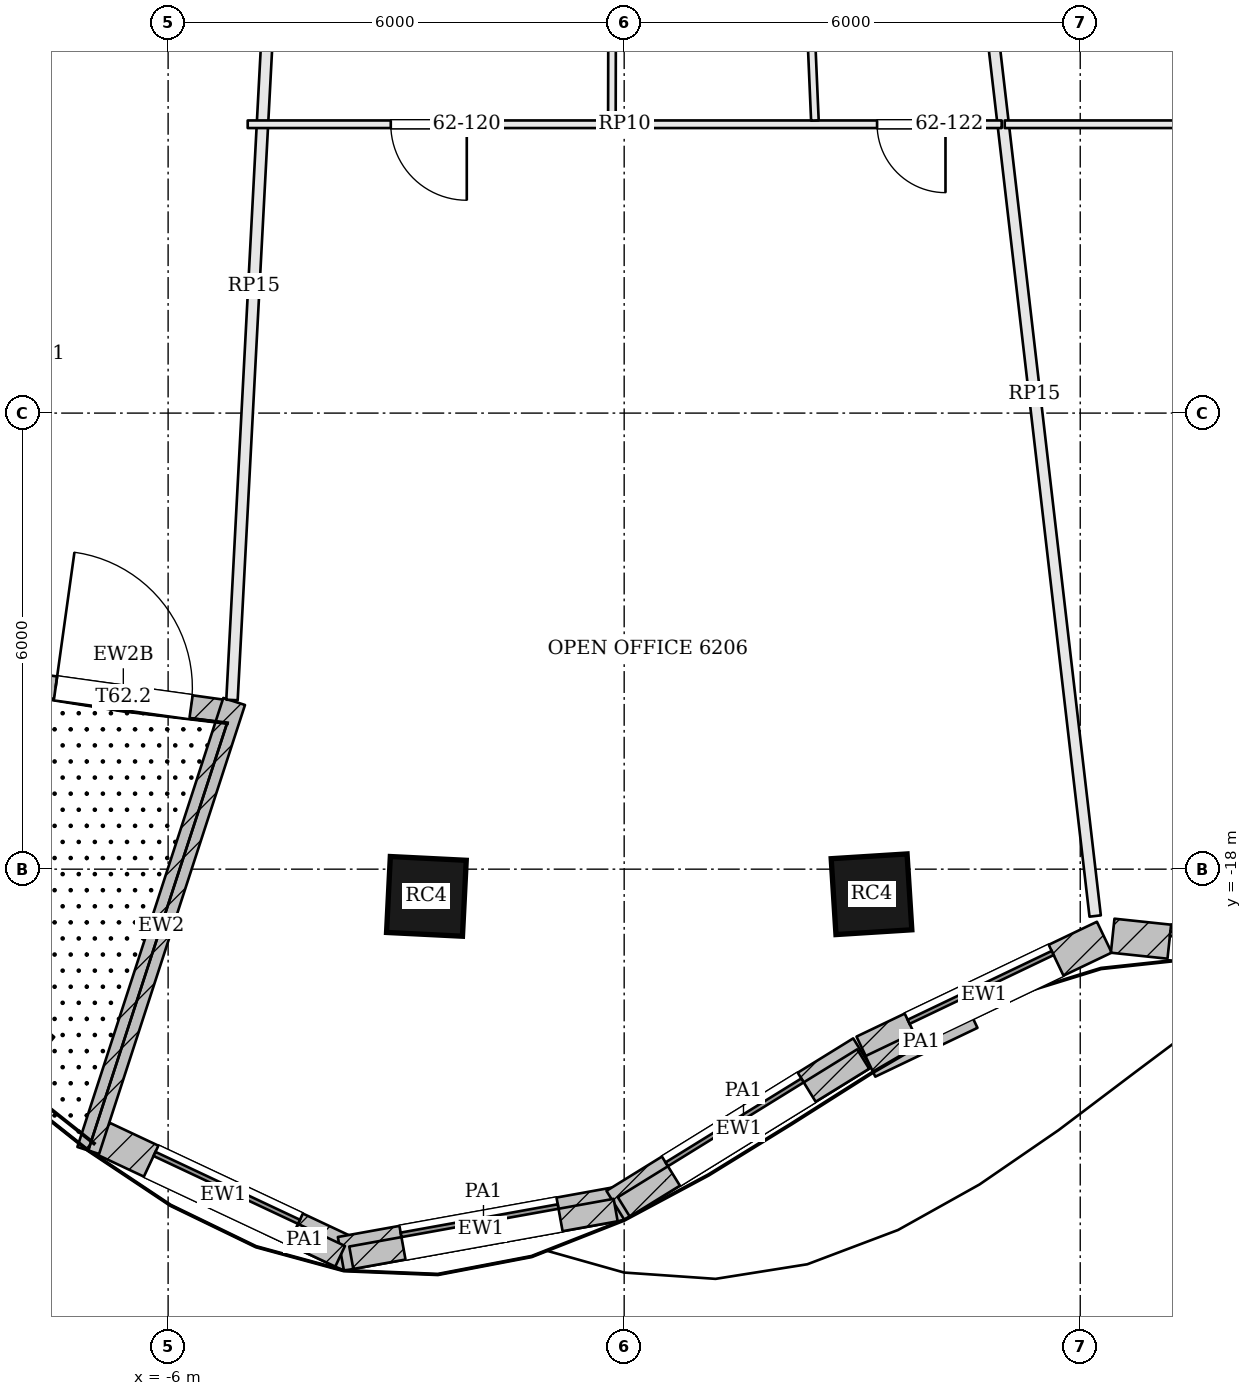
"""IFC4 building model, lengths in metres.
Left out: names, types, materials, properties, quantities, classifications, styles, units other than length and angle.
Written with IfcOpenShell. Run it as: python <this file> out.ifc"""

import sys

from ifc_helpers import new_model, si_unit, direction, frame, frame_2d, origin, origin_2d, place, context, subcontext, project, spatial, rectangle, extrude, element, fill, save


model = new_model("IFC4")
c1 = context("Model", 3, precision=1e-05, world=origin(), true_north=direction((0.0, 1.0)))
c2 = subcontext(c1, "Body", "Model", "MODEL_VIEW")
j1 = project(units=[si_unit("LENGTHUNIT", "METRE"), si_unit("PLANEANGLEUNIT", "RADIAN")], contexts=[c1])
p1 = place(None, origin())
s1 = spatial("IfcSite", under=j1, at=p1, CompositionType="ELEMENT")
p2 = place(p1, origin())
s2 = spatial("IfcBuilding", under=s1, at=p2, CompositionType="ELEMENT")
p3 = place(p2, frame((0.0, 0.0, 252.6)))
s3 = spatial("IfcBuildingStorey", under=s2, at=p3, CompositionType="ELEMENT", Elevation=252.6)
for number, where, z_axis, x_axis in (
    (1, (-2.602, -18.358, 0.0), (0.0, 0.0, 1.0), (0.999, -0.05, 0.0)),
    (2, (3.254, -18.33, 0.0), (0.0, 0.0, 1.0), (0.998, 0.063, 0.0)),
):
    element("IfcColumn", number, at=place(p3, frame(where, z_axis=z_axis, x_axis=x_axis)), inside=s3, PredefinedType="COLUMN", context=c2, shape_type="SweptSolid", body=[
        extrude(rectangle(XDim=1.0, YDim=1.0, at=origin_2d()), origin(), (0.0, 0.0, 1.0), 3.9),
    ])
p4 = place(p3, frame((-7.975, -15.544, 0.0), z_axis=(0.0, 0.0, 1.0), x_axis=(0.990444006368, -0.137915446016, 0.0)))
e3 = element("IfcWall", 3, at=p4, inside=s3, PredefinedType="SOLIDWALL", context=c2, shape_type="SweptSolid", body=[
    extrude(rectangle(XDim=2.799, YDim=0.3, at=frame_2d((1.399, 0.0))), origin(), (0.0, 0.0, 1.0), 3.104),
])
p5 = place(p4, frame((0.5, 0.0, 0.0)))
e4 = element("IfcOpeningElement", 4, at=p5, cuts=e3, PredefinedType="OPENING", context=c2, shape_type="SweptSolid", body=[
    extrude(rectangle(XDim=1.8, YDim=2.4, at=frame_2d((0.9, 1.2))), frame((0.0, 0.16, 0.0), z_axis=(0.0, -1.0, 0.0), x_axis=(1.0, 0.0, 0.0)), (0.0, 0.0, 1.0), 0.32),
])
p6 = place(p3, frame((-6.955, -21.497, 0.0), z_axis=(0.0, 0.0, 1.0), x_axis=(0.905026988762, -0.425354146108, 0.0)))
e5 = element("IfcWall", 5, at=p6, inside=s3, PredefinedType="SOLIDWALL", context=c2, shape_type="SweptSolid", body=[
    extrude(rectangle(XDim=3.717, YDim=0.45, at=frame_2d((1.858, 0.0))), origin(), (0.0, 0.0, 1.0), 3.7),
])
p7 = place(p6, frame((0.809, 0.0, 0.9)))
e6 = element("IfcOpeningElement", 6, at=p7, cuts=e5, PredefinedType="OPENING", context=c2, shape_type="SweptSolid", body=[
    extrude(rectangle(XDim=2.1, YDim=2.3, at=frame_2d((1.05, 1.15))), frame((0.0, 0.235, 0.0), z_axis=(0.0, -1.0, 0.0), x_axis=(1.0, 0.0, 0.0)), (0.0, 0.0, 1.0), 0.47),
])
p8 = place(p3, frame((-3.727, -23.061, 0.0), z_axis=(0.0, 0.0, 1.0), x_axis=(0.984119180424, 0.177508982087, 0.0)))
e7 = element("IfcWall", 7, at=p8, inside=s3, PredefinedType="SOLIDWALL", context=c2, shape_type="SweptSolid", body=[
    extrude(rectangle(XDim=3.747, YDim=0.45, at=frame_2d((1.873, 0.0))), origin(), (0.0, 0.0, 1.0), 3.7),
])
p9 = place(p8, frame((0.823, 0.0, 0.9)))
e8 = element("IfcOpeningElement", 8, at=p9, cuts=e7, PredefinedType="OPENING", context=c2, shape_type="SweptSolid", body=[
    extrude(rectangle(XDim=2.1, YDim=2.3, at=frame_2d((1.05, 1.15))), frame((0.0, 0.235, 0.0), z_axis=(0.0, -1.0, 0.0), x_axis=(1.0, 0.0, 0.0)), (0.0, 0.0, 1.0), 0.47),
])
p10 = place(p3, frame((-0.115, -22.424, 0.0), z_axis=(0.0, 0.0, 1.0), x_axis=(0.8506970368, 0.525656305564, 0.0)))
e9 = element("IfcWall", 9, at=p10, inside=s3, PredefinedType="SOLIDWALL", context=c2, shape_type="SweptSolid", body=[
    extrude(rectangle(XDim=3.816, YDim=0.45, at=frame_2d((1.908, 0.0))), origin(), (0.0, 0.0, 1.0), 3.7),
])
p11 = place(p10, frame((0.858, 0.0, 0.9)))
e10 = element("IfcOpeningElement", 10, at=p11, cuts=e9, PredefinedType="OPENING", context=c2, shape_type="SweptSolid", body=[
    extrude(rectangle(XDim=2.1, YDim=2.3, at=frame_2d((1.05, 1.15))), frame((0.0, 0.235, 0.0), z_axis=(0.0, -1.0, 0.0), x_axis=(1.0, 0.0, 0.0)), (0.0, 0.0, 1.0), 0.47),
])
p12 = place(p3, frame((3.154, -20.406, 0.0), z_axis=(0.0, 0.0, 1.0), x_axis=(0.902333313, 0.431038968367, 0.0)))
e11 = element("IfcWall", 11, at=p12, inside=s3, PredefinedType="SOLIDWALL", context=c2, shape_type="SweptSolid", body=[
    extrude(rectangle(XDim=3.505, YDim=0.45, at=frame_2d((1.753, 0.0))), origin(), (0.0, 0.0, 1.0), 3.7),
])
p13 = place(p12, frame((0.703, 0.0, 0.9)))
e12 = element("IfcOpeningElement", 12, at=p13, cuts=e11, PredefinedType="OPENING", context=c2, shape_type="SweptSolid", body=[
    extrude(rectangle(XDim=2.1, YDim=2.3, at=frame_2d((1.05, 1.15))), frame((0.0, 0.235, 0.0), z_axis=(0.0, -1.0, 0.0), x_axis=(1.0, 0.0, 0.0)), (0.0, 0.0, 1.0), 0.47),
])
p14 = place(p3, frame((6.427, -18.875, 0.0), z_axis=(0.0, 0.0, 1.0), x_axis=(0.994433468803, -0.10536638992, 0.0)))
e13 = element("IfcWall", 13, at=p14, inside=s3, PredefinedType="SOLIDWALL", context=c2, shape_type="SweptSolid", body=[
    extrude(rectangle(XDim=3.598, YDim=0.45, at=frame_2d((1.799, 0.0))), origin(), (0.0, 0.0, 1.0), 3.7),
])
p15 = place(p14, frame((0.749, 0.0, 0.9)))
e14 = element("IfcOpeningElement", 14, at=p15, cuts=e13, PredefinedType="OPENING", context=c2, shape_type="SweptSolid", body=[
    extrude(rectangle(XDim=2.1, YDim=2.3, at=frame_2d((1.05, 1.15))), frame((0.0, 0.235, 0.0), z_axis=(0.0, -1.0, 0.0), x_axis=(1.0, 0.0, 0.0)), (0.0, 0.0, 1.0), 0.47),
])
p16 = place(p3, frame((-7.051, -21.701, 0.0), z_axis=(0.0, 0.0, 1.0), x_axis=(0.309061186731, 0.951042156193, 0.0)))
e15 = element("IfcWall", 15, at=p16, inside=s3, PredefinedType="SOLIDWALL", context=c2, shape_type="SweptSolid", body=[
    extrude(rectangle(XDim=6.211, YDim=0.3, at=frame_2d((3.106, 0.0))), origin(), (0.0, 0.0, 1.0), 3.254),
])
p17 = place(p3, frame((-8.547, -19.714, 0.0), z_axis=(0.0, 0.0, 1.0), x_axis=(0.763336647432, -0.646000899912, 0.0)))
e16 = element("IfcWall", 16, at=p17, inside=s3, PredefinedType="SOLIDWALL", context=c2, shape_type="SweptSolid", body=[
    extrude(rectangle(XDim=1.119, YDim=0.6, at=frame_2d((0.56, 0.0))), origin(), (0.0, 0.0, 1.0), 0.6),
])
p18 = place(p3, frame((-4.667, -22.656, 3.9), z_axis=(0.0, 0.0, 1.0), x_axis=(0.905050240273, -0.425304670304, 0.0)))
e17 = element("IfcWall", 17, at=p18, inside=s3, PredefinedType="PARAPET", context=c2, shape_type="SweptSolid", body=[
    extrude(rectangle(XDim=1.027, YDim=0.3, at=frame_2d((0.513, 0.0))), origin(), (0.0, 0.0, 1.0), 1.1),
])
p19 = place(p3, frame((-3.59, -23.112, 3.9), z_axis=(0.0, 0.0, 1.0), x_axis=(0.984124248147, 0.177480884064, 0.0)))
e18 = element("IfcWall", 18, at=p19, inside=s3, PredefinedType="PARAPET", context=c2, shape_type="SweptSolid", body=[
    extrude(rectangle(XDim=3.534, YDim=0.3, at=frame_2d((1.767, 0.0))), origin(), (0.0, 0.0, 1.0), 1.1),
])
p20 = place(p3, frame((-0.005, -22.444, 3.9), z_axis=(0.0, 0.0, 1.0), x_axis=(0.850710394144, 0.525634688063, 0.0)))
e19 = element("IfcWall", 19, at=p20, inside=s3, PredefinedType="PARAPET", context=c2, shape_type="SweptSolid", body=[
    extrude(rectangle(XDim=3.702, YDim=0.3, at=frame_2d((1.851, 0.0))), origin(), (0.0, 0.0, 1.0), 1.1),
])
p21 = place(p3, frame((3.239, -20.594, 3.9), z_axis=(0.0, 0.0, 1.0), x_axis=(0.902344893923, 0.431014724123, 0.0)))
e20 = element("IfcWall", 20, at=p21, inside=s3, PredefinedType="PARAPET", context=c2, shape_type="SweptSolid", body=[
    extrude(rectangle(XDim=1.49, YDim=0.3, at=frame_2d((0.745, 0.0))), origin(), (0.0, 0.0, 1.0), 1.1),
])
p22 = place(p3, frame((-5.16, -15.774, 0.0), z_axis=(0.0, 0.0, 1.0), x_axis=(0.052855857128, 0.998602152194, 0.0)))
e21 = element("IfcWall", 21, at=p22, inside=s3, PredefinedType="PARTITIONING", context=c2, shape_type="SweptSolid", body=[
    extrude(rectangle(XDim=10.915, YDim=0.15, at=frame_2d((5.457, 0.0))), origin(), (0.0, 0.0, 1.0), 3.084),
])
p23 = place(p3, frame((6.197, -18.616, 0.0), z_axis=(0.0, 0.0, 1.0), x_axis=(-0.115396385648, 0.993319522701, 0.0)))
e22 = element("IfcWall", 22, at=p23, inside=s3, PredefinedType="PARTITIONING", context=c2, shape_type="SweptSolid", body=[
    extrude(rectangle(XDim=13.834, YDim=0.15, at=frame_2d((6.917, 0.0))), origin(), (0.0, 0.0, 1.0), 3.084),
])
p24 = place(p3, frame((4.966, -8.2, 0.0), z_axis=(0.0, 0.0, 1.0), x_axis=(-1.0, 0.0, 0.0)))
e23 = element("IfcWall", 23, at=p24, inside=s3, PredefinedType="PARTITIONING", context=c2, shape_type="SweptSolid", body=[
    extrude(rectangle(XDim=9.919, YDim=0.1, at=frame_2d((4.959, 0.0))), origin(), (0.0, 0.0, 1.0), 3.084),
])
p25 = place(p24, frame((7.037, 0.0, 0.0)))
e24 = element("IfcOpeningElement", 24, at=p25, cuts=e23, PredefinedType="OPENING", context=c2, shape_type="SweptSolid", body=[
    extrude(rectangle(XDim=1.0, YDim=2.1, at=frame_2d((0.5, 1.05))), frame((0.0, 0.06, 0.0), z_axis=(0.0, -1.0, 0.0), x_axis=(1.0, 0.0, 0.0)), (0.0, 0.0, 1.0), 0.12),
])
p26 = place(p24, frame((0.739, 0.0, 0.0)))
e25 = element("IfcOpeningElement", 25, at=p26, cuts=e23, PredefinedType="OPENING", context=c2, shape_type="SweptSolid", body=[
    extrude(rectangle(XDim=0.9, YDim=2.1, at=frame_2d((0.45, 1.05))), frame((0.0, 0.06, 0.0), z_axis=(0.0, -1.0, 0.0), x_axis=(1.0, 0.0, 0.0)), (0.0, 0.0, 1.0), 0.12),
])
p27 = place(p3, frame((-0.155, -4.875, 0.0), z_axis=(0.0, 0.0, 1.0), x_axis=(-0.002012818347, -0.999997974279, 0.0)))
e26 = element("IfcWall", 26, at=p27, inside=s3, PredefinedType="PARTITIONING", context=c2, shape_type="SweptSolid", body=[
    extrude(rectangle(XDim=3.275, YDim=0.1, at=frame_2d((1.637, 0.0))), origin(), (0.0, 0.0, 1.0), 3.084),
])
p28 = place(p3, frame((2.368, -4.875, 0.0), z_axis=(0.0, 0.0, 1.0), x_axis=(0.043123705059, -0.999069740339, 0.0)))
e27 = element("IfcWall", 27, at=p28, inside=s3, PredefinedType="PARTITIONING", context=c2, shape_type="SweptSolid", body=[
    extrude(rectangle(XDim=3.278, YDim=0.1, at=frame_2d((1.639, 0.0))), origin(), (0.0, 0.0, 1.0), 3.084),
])
p29 = place(p3, frame((15.087, -8.2, 0.0), z_axis=(0.0, 0.0, 1.0), x_axis=(-1.0, 0.0, 0.0)))
e28 = element("IfcWall", 28, at=p29, inside=s3, PredefinedType="PARTITIONING", context=c2, shape_type="SweptSolid", body=[
    extrude(rectangle(XDim=10.081, YDim=0.1, at=frame_2d((5.041, 0.0))), origin(), (0.0, 0.0, 1.0), 3.084),
])
p30 = place(p29, frame((6.841, 0.0, 0.0)))
e29 = element("IfcOpeningElement", 29, at=p30, cuts=e28, PredefinedType="OPENING", context=c2, shape_type="SweptSolid", body=[
    extrude(rectangle(XDim=1.0, YDim=2.1, at=frame_2d((0.5, 1.05))), frame((0.0, 0.06, 0.0), z_axis=(0.0, -1.0, 0.0), x_axis=(1.0, 0.0, 0.0)), (0.0, 0.0, 1.0), 0.12),
])
p31 = place(p5, origin())
e30 = element("IfcDoor", 30, at=p31, inside=s3, OperationType="DOUBLE_DOOR_DOUBLE_SWING", PredefinedType="DOOR", context=c2, shape_type="SweptSolid", body=[
    extrude(rectangle(XDim=1.8, YDim=2.4, at=frame_2d((0.9, 1.2))), frame((0.0, 0.025, 0.0), z_axis=(0.0, -1.0, 0.0), x_axis=(1.0, 0.0, 0.0)), (0.0, 0.0, 1.0), 0.05),
])
fill(e4, e30)
p32 = place(p7, origin())
e31 = element("IfcWindow", 31, at=p32, inside=s3, PartitioningType="SINGLE_PANEL", PredefinedType="WINDOW", context=c2, shape_type="SweptSolid", body=[
    extrude(rectangle(XDim=2.1, YDim=2.3, at=frame_2d((1.05, 1.15))), frame((0.0, 0.135, 0.0), z_axis=(0.0, -1.0, 0.0), x_axis=(1.0, 0.0, 0.0)), (0.0, 0.0, 1.0), 0.06),
])
fill(e6, e31)
p33 = place(p9, origin())
e32 = element("IfcWindow", 32, at=p33, inside=s3, PartitioningType="SINGLE_PANEL", PredefinedType="WINDOW", context=c2, shape_type="SweptSolid", body=[
    extrude(rectangle(XDim=2.1, YDim=2.3, at=frame_2d((1.05, 1.15))), frame((0.0, 0.135, 0.0), z_axis=(0.0, -1.0, 0.0), x_axis=(1.0, 0.0, 0.0)), (0.0, 0.0, 1.0), 0.06),
])
fill(e8, e32)
p34 = place(p11, origin())
e33 = element("IfcWindow", 33, at=p34, inside=s3, PartitioningType="SINGLE_PANEL", PredefinedType="WINDOW", context=c2, shape_type="SweptSolid", body=[
    extrude(rectangle(XDim=2.1, YDim=2.3, at=frame_2d((1.05, 1.15))), frame((0.0, 0.135, 0.0), z_axis=(0.0, -1.0, 0.0), x_axis=(1.0, 0.0, 0.0)), (0.0, 0.0, 1.0), 0.06),
])
fill(e10, e33)
p35 = place(p13, origin())
e34 = element("IfcWindow", 34, at=p35, inside=s3, PartitioningType="SINGLE_PANEL", PredefinedType="WINDOW", context=c2, shape_type="SweptSolid", body=[
    extrude(rectangle(XDim=2.1, YDim=2.3, at=frame_2d((1.05, 1.15))), frame((0.0, 0.135, 0.0), z_axis=(0.0, -1.0, 0.0), x_axis=(1.0, 0.0, 0.0)), (0.0, 0.0, 1.0), 0.06),
])
fill(e12, e34)
p36 = place(p15, origin())
e35 = element("IfcWindow", 35, at=p36, inside=s3, PartitioningType="SINGLE_PANEL", PredefinedType="WINDOW", context=c2, shape_type="SweptSolid", body=[
    extrude(rectangle(XDim=2.1, YDim=2.3, at=frame_2d((1.05, 1.15))), frame((0.0, 0.135, 0.0), z_axis=(0.0, -1.0, 0.0), x_axis=(1.0, 0.0, 0.0)), (0.0, 0.0, 1.0), 0.06),
])
fill(e14, e35)
p37 = place(p25, origin())
e36 = element("IfcDoor", 36, at=p37, inside=s3, OperationType="SINGLE_SWING_LEFT", PredefinedType="DOOR", context=c2, shape_type="SweptSolid", body=[
    extrude(rectangle(XDim=1.0, YDim=2.1, at=frame_2d((0.5, 1.05))), frame((0.0, 0.025, 0.0), z_axis=(0.0, -1.0, 0.0), x_axis=(1.0, 0.0, 0.0)), (0.0, 0.0, 1.0), 0.05),
])
fill(e24, e36)
p38 = place(p26, origin())
e37 = element("IfcDoor", 37, at=p38, inside=s3, OperationType="SINGLE_SWING_LEFT", PredefinedType="DOOR", context=c2, shape_type="SweptSolid", body=[
    extrude(rectangle(XDim=0.9, YDim=2.1, at=frame_2d((0.45, 1.05))), frame((0.0, 0.025, 0.0), z_axis=(0.0, -1.0, 0.0), x_axis=(1.0, 0.0, 0.0)), (0.0, 0.0, 1.0), 0.05),
])
fill(e25, e37)
save(model, sys.argv[1])
